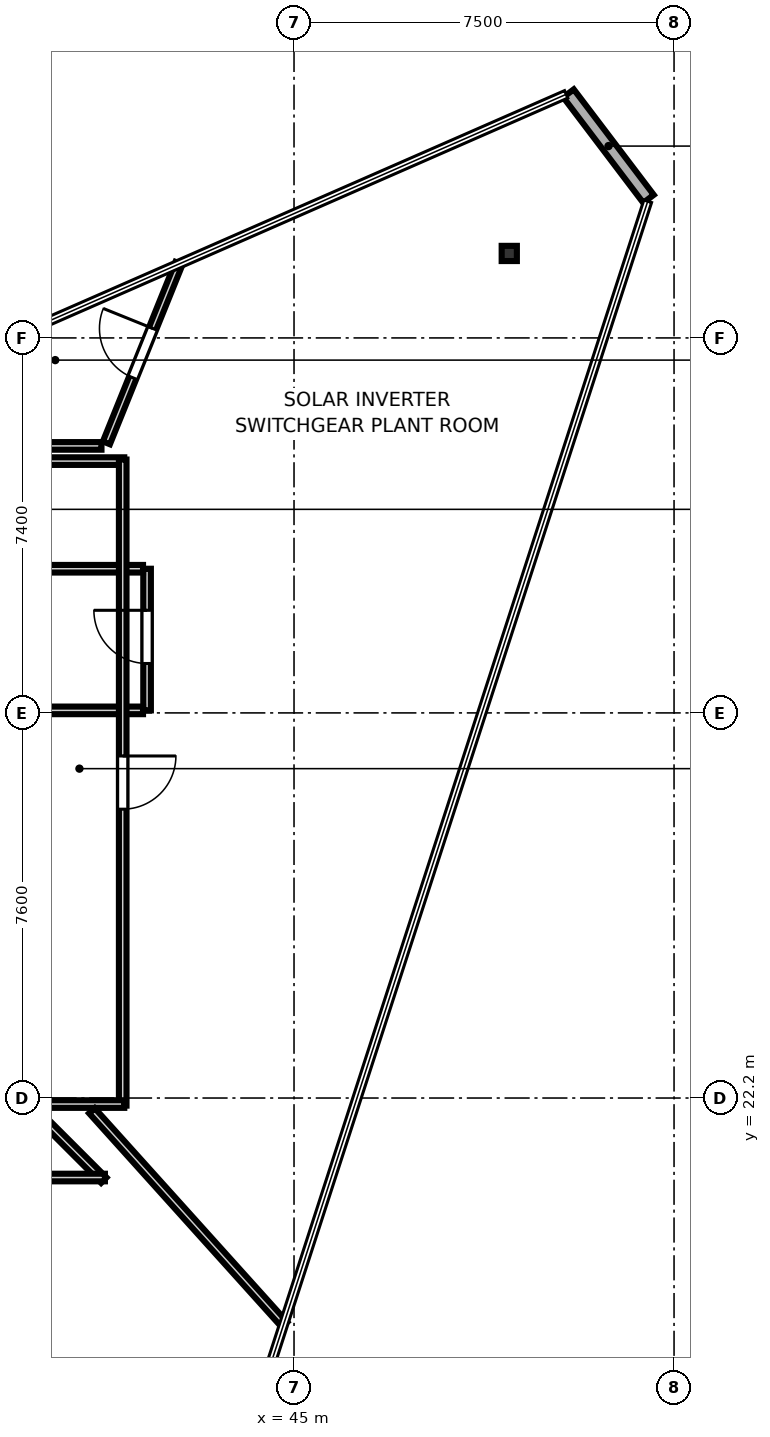
"""IFC4 building model, lengths in metres.
Left out: names, types, materials, properties, quantities, classifications, styles, units other than length and angle.
Written with IfcOpenShell. Run it as: python <this file> out.ifc"""

import sys

from ifc_helpers import new_model, si_unit, direction, frame, frame_2d, origin, origin_2d, place, context, subcontext, project, spatial, rectangle, i_section, extrude, element, fill, save


model = new_model("IFC4")
c1 = context("Model", 3, precision=1e-05, world=origin(), true_north=direction((0.0, 1.0)))
c2 = subcontext(c1, "Body", "Model", "MODEL_VIEW")
j1 = project(units=[si_unit("LENGTHUNIT", "METRE"), si_unit("PLANEANGLEUNIT", "RADIAN")], contexts=[c1])
p1 = place(None, origin())
s1 = spatial("IfcSite", under=j1, at=p1, CompositionType="ELEMENT")
p2 = place(p1, origin())
s2 = spatial("IfcBuilding", under=s1, at=p2, CompositionType="ELEMENT")
p3 = place(p2, frame((0.0, 0.0, 367.55)))
s3 = spatial("IfcBuildingStorey", under=s2, at=p3, CompositionType="ELEMENT", Elevation=367.55)
p4 = place(p3, frame((49.248, 38.867, 0.0), z_axis=(0.0, 0.0, 1.0), x_axis=(1.0, 0.0, 0.0)))
e1 = element("IfcColumn", 1, at=p4, inside=s3, PredefinedType="COLUMN", context=c2, shape_type="SweptSolid", body=[
    extrude(i_section(OverallWidth=0.3, OverallDepth=0.3, WebThickness=0.01, FlangeThickness=0.015, at=origin_2d()), origin(), (0.0, 0.0, 1.0), 3.75),
])
p5 = place(p3, frame((51.996, 39.944, 0.0), z_axis=(0.0, 0.0, 1.0), x_axis=(-0.604042927758, 0.796951781117, 0.0)))
e2 = element("IfcWall", 2, at=p5, inside=s3, PredefinedType="SOLIDWALL", context=c2, shape_type="SweptSolid", body=[
    extrude(rectangle(XDim=2.614, YDim=0.26, at=frame_2d((1.307, 0.0))), origin(), (0.0, 0.0, 1.0), 3.55),
])
p6 = place(p3, frame((42.1, 29.85, 0.0), z_axis=(0.0, 0.0, 1.0), x_axis=(0.0, 1.0, 0.0)))
e3 = element("IfcWall", 3, at=p6, inside=s3, PredefinedType="PARTITIONING", context=c2, shape_type="SweptSolid", body=[
    extrude(rectangle(XDim=2.795, YDim=0.15, at=frame_2d((1.397, 0.0))), origin(), (0.0, 0.0, 1.0), 2.87),
])
p7 = place(p6, frame((0.925, 0.0, 0.0)))
e4 = element("IfcOpeningElement", 4, at=p7, cuts=e3, PredefinedType="OPENING", context=c2, shape_type="SweptSolid", body=[
    extrude(rectangle(XDim=1.05, YDim=2.15, at=frame_2d((0.525, 1.075))), frame((0.0, 0.085, 0.0), z_axis=(0.0, -1.0, 0.0), x_axis=(1.0, 0.0, 0.0)), (0.0, 0.0, 1.0), 0.17),
])
for number, where, z_axis, x_axis in (
    (5, (39.96, 29.85, 0.0), (0.0, 0.0, 1.0), (1.0, 0.0, 0.0)),
    (6, (39.96, 32.645, 0.0), (0.0, 0.0, 1.0), (1.0, 0.0, 0.0)),
):
    element("IfcWall", number, at=place(p3, frame(where, z_axis=z_axis, x_axis=x_axis)), inside=s3, PredefinedType="PARTITIONING", context=c2, shape_type="SweptSolid", body=[
        extrude(rectangle(XDim=2.06, YDim=0.15, at=frame_2d((1.03, 0.0))), origin(), (0.0, 0.0, 1.0), 2.87),
    ])
p8 = place(p3, frame((39.88, 34.769, 0.0), z_axis=(0.0, 0.0, 1.0), x_axis=(1.0, 0.0, 0.0)))
e7 = element("IfcWall", 7, at=p8, inside=s3, PredefinedType="PARTITIONING", context=c2, shape_type="SweptSolid", body=[
    extrude(rectangle(XDim=1.77, YDim=0.15, at=frame_2d((0.885, 0.0))), origin(), (0.0, 0.0, 1.0), 2.87),
])
p9 = place(p3, frame((41.619, 34.8, 0.0), z_axis=(0.0, 0.0, 1.0), x_axis=(0.0, -1.0, 0.0)))
e8 = element("IfcWall", 8, at=p9, inside=s3, PredefinedType="PARTITIONING", context=c2, shape_type="SweptSolid", body=[
    extrude(rectangle(XDim=12.75, YDim=0.15, at=frame_2d((6.375, 0.0))), origin(), (0.0, 0.0, 1.0), 2.87),
])
p10 = place(p9, frame((5.85, 0.0, 0.0)))
e9 = element("IfcOpeningElement", 9, at=p10, cuts=e8, PredefinedType="OPENING", context=c2, shape_type="SweptSolid", body=[
    extrude(rectangle(XDim=1.05, YDim=2.15, at=frame_2d((0.525, 1.075))), frame((0.0, 0.085, 0.0), z_axis=(0.0, -1.0, 0.0), x_axis=(1.0, 0.0, 0.0)), (0.0, 0.0, 1.0), 0.17),
])
p11 = place(p3, frame((41.65, 22.081, 0.0), z_axis=(0.0, 0.0, 1.0), x_axis=(-1.0, 0.0, 0.0)))
e10 = element("IfcWall", 10, at=p11, inside=s3, PredefinedType="PARTITIONING", context=c2, shape_type="SweptSolid", body=[
    extrude(rectangle(XDim=1.77, YDim=0.15, at=frame_2d((0.885, 0.0))), origin(), (0.0, 0.0, 1.0), 2.87),
])
p12 = place(p3, frame((34.52, 35.069, 0.0), z_axis=(0.0, 0.0, 1.0), x_axis=(1.0, 0.0, 0.0)))
e11 = element("IfcWall", 11, at=p12, inside=s3, PredefinedType="PARTITIONING", context=c2, shape_type="SweptSolid", body=[
    extrude(rectangle(XDim=6.68, YDim=0.15, at=frame_2d((3.34, 0.0))), origin(), (0.0, 0.0, 1.0), 2.87),
])
p13 = place(p12, frame((2.535, 0.0, 0.0)))
e12 = element("IfcOpeningElement", 12, at=p13, cuts=e11, PredefinedType="OPENING", context=c2, shape_type="SweptSolid", body=[
    extrude(rectangle(XDim=1.05, YDim=2.15, at=frame_2d((0.525, 1.075))), frame((0.0, 0.085, 0.0), z_axis=(0.0, -1.0, 0.0), x_axis=(1.0, 0.0, 0.0)), (0.0, 0.0, 1.0), 0.17),
])
p14 = place(p3, frame((39.796, 22.028, 0.0), z_axis=(0.0, 0.0, 1.0), x_axis=(0.707106781187, -0.707106781187, 0.0)))
e13 = element("IfcWall", 13, at=p14, inside=s3, PredefinedType="PARTITIONING", context=c2, shape_type="SweptSolid", body=[
    extrude(rectangle(XDim=2.051, YDim=0.15, at=frame_2d((1.025, 0.0))), origin(), (0.0, 0.0, 1.0), 2.87),
])
p15 = place(p3, frame((41.268, 20.631, 0.0), z_axis=(0.0, 0.0, 1.0), x_axis=(-1.0, 0.0, 0.0)))
e14 = element("IfcWall", 14, at=p15, inside=s3, PredefinedType="PARTITIONING", context=c2, shape_type="SweptSolid", body=[
    extrude(rectangle(XDim=16.057, YDim=0.15, at=frame_2d((8.028, 0.0))), origin(), (0.0, 0.0, 1.0), 2.87),
])
p16 = place(p15, frame((7.384, 0.0, 0.0)))
e15 = element("IfcOpeningElement", 15, at=p16, cuts=e14, PredefinedType="OPENING", context=c2, shape_type="SweptSolid", body=[
    extrude(rectangle(XDim=1.05, YDim=2.15, at=frame_2d((0.525, 1.075))), frame((0.0, 0.085, 0.0), z_axis=(0.0, -1.0, 0.0), x_axis=(1.0, 0.0, 0.0)), (0.0, 0.0, 1.0), 0.17),
])
p17 = place(p3, frame((41.011, 21.949, 0.0), z_axis=(0.0, 0.0, 1.0), x_axis=(0.669147587513, -0.743129535226, 0.0)))
e16 = element("IfcWall", 16, at=p17, inside=s3, PredefinedType="PARTITIONING", context=c2, shape_type="SweptSolid", body=[
    extrude(rectangle(XDim=5.679, YDim=0.15, at=frame_2d((2.84, 0.0))), origin(), (0.0, 0.0, 1.0), 2.87),
])
p18 = place(p3, frame((41.297, 35.129, 0.0), z_axis=(0.0, 0.0, 1.0), x_axis=(0.374615121192, 0.927180409076, 0.0)))
e17 = element("IfcWall", 17, at=p18, inside=s3, PredefinedType="PARTITIONING", context=c2, shape_type="SweptSolid", body=[
    extrude(rectangle(XDim=3.822, YDim=0.15, at=frame_2d((1.911, 0.0))), origin(), (0.0, 0.0, 1.0), 2.87),
])
p19 = place(p18, frame((1.386, 0.0, 0.0)))
e18 = element("IfcOpeningElement", 18, at=p19, cuts=e17, PredefinedType="OPENING", context=c2, shape_type="SweptSolid", body=[
    extrude(rectangle(XDim=1.05, YDim=2.15, at=frame_2d((0.525, 1.075))), frame((0.0, 0.085, 0.0), z_axis=(0.0, -1.0, 0.0), x_axis=(1.0, 0.0, 0.0)), (0.0, 0.0, 1.0), 0.17),
])
p20 = place(p7, origin())
e19 = element("IfcDoor", 19, at=p20, inside=s3, OperationType="SINGLE_SWING_RIGHT", PredefinedType="DOOR", context=c2, shape_type="SweptSolid", body=[
    extrude(rectangle(XDim=1.05, YDim=2.15, at=frame_2d((0.525, 1.075))), frame((0.0, 0.025, 0.0), z_axis=(0.0, -1.0, 0.0), x_axis=(1.0, 0.0, 0.0)), (0.0, 0.0, 1.0), 0.05),
])
fill(e4, e19)
p21 = place(p10, origin())
e20 = element("IfcDoor", 20, at=p21, inside=s3, OperationType="SINGLE_SWING_LEFT", PredefinedType="DOOR", context=c2, shape_type="SweptSolid", body=[
    extrude(rectangle(XDim=1.05, YDim=2.15, at=frame_2d((0.525, 1.075))), frame((0.0, 0.025, 0.0), z_axis=(0.0, -1.0, 0.0), x_axis=(1.0, 0.0, 0.0)), (0.0, 0.0, 1.0), 0.05),
])
fill(e9, e20)
p22 = place(p19, origin())
e21 = element("IfcDoor", 21, at=p22, inside=s3, OperationType="SINGLE_SWING_RIGHT", PredefinedType="DOOR", context=c2, shape_type="SweptSolid", body=[
    extrude(rectangle(XDim=1.05, YDim=2.15, at=frame_2d((0.525, 1.075))), frame((0.0, 0.025, 0.0), z_axis=(0.0, -1.0, 0.0), x_axis=(1.0, 0.0, 0.0)), (0.0, 0.0, 1.0), 0.05),
])
fill(e18, e21)
save(model, sys.argv[1])
